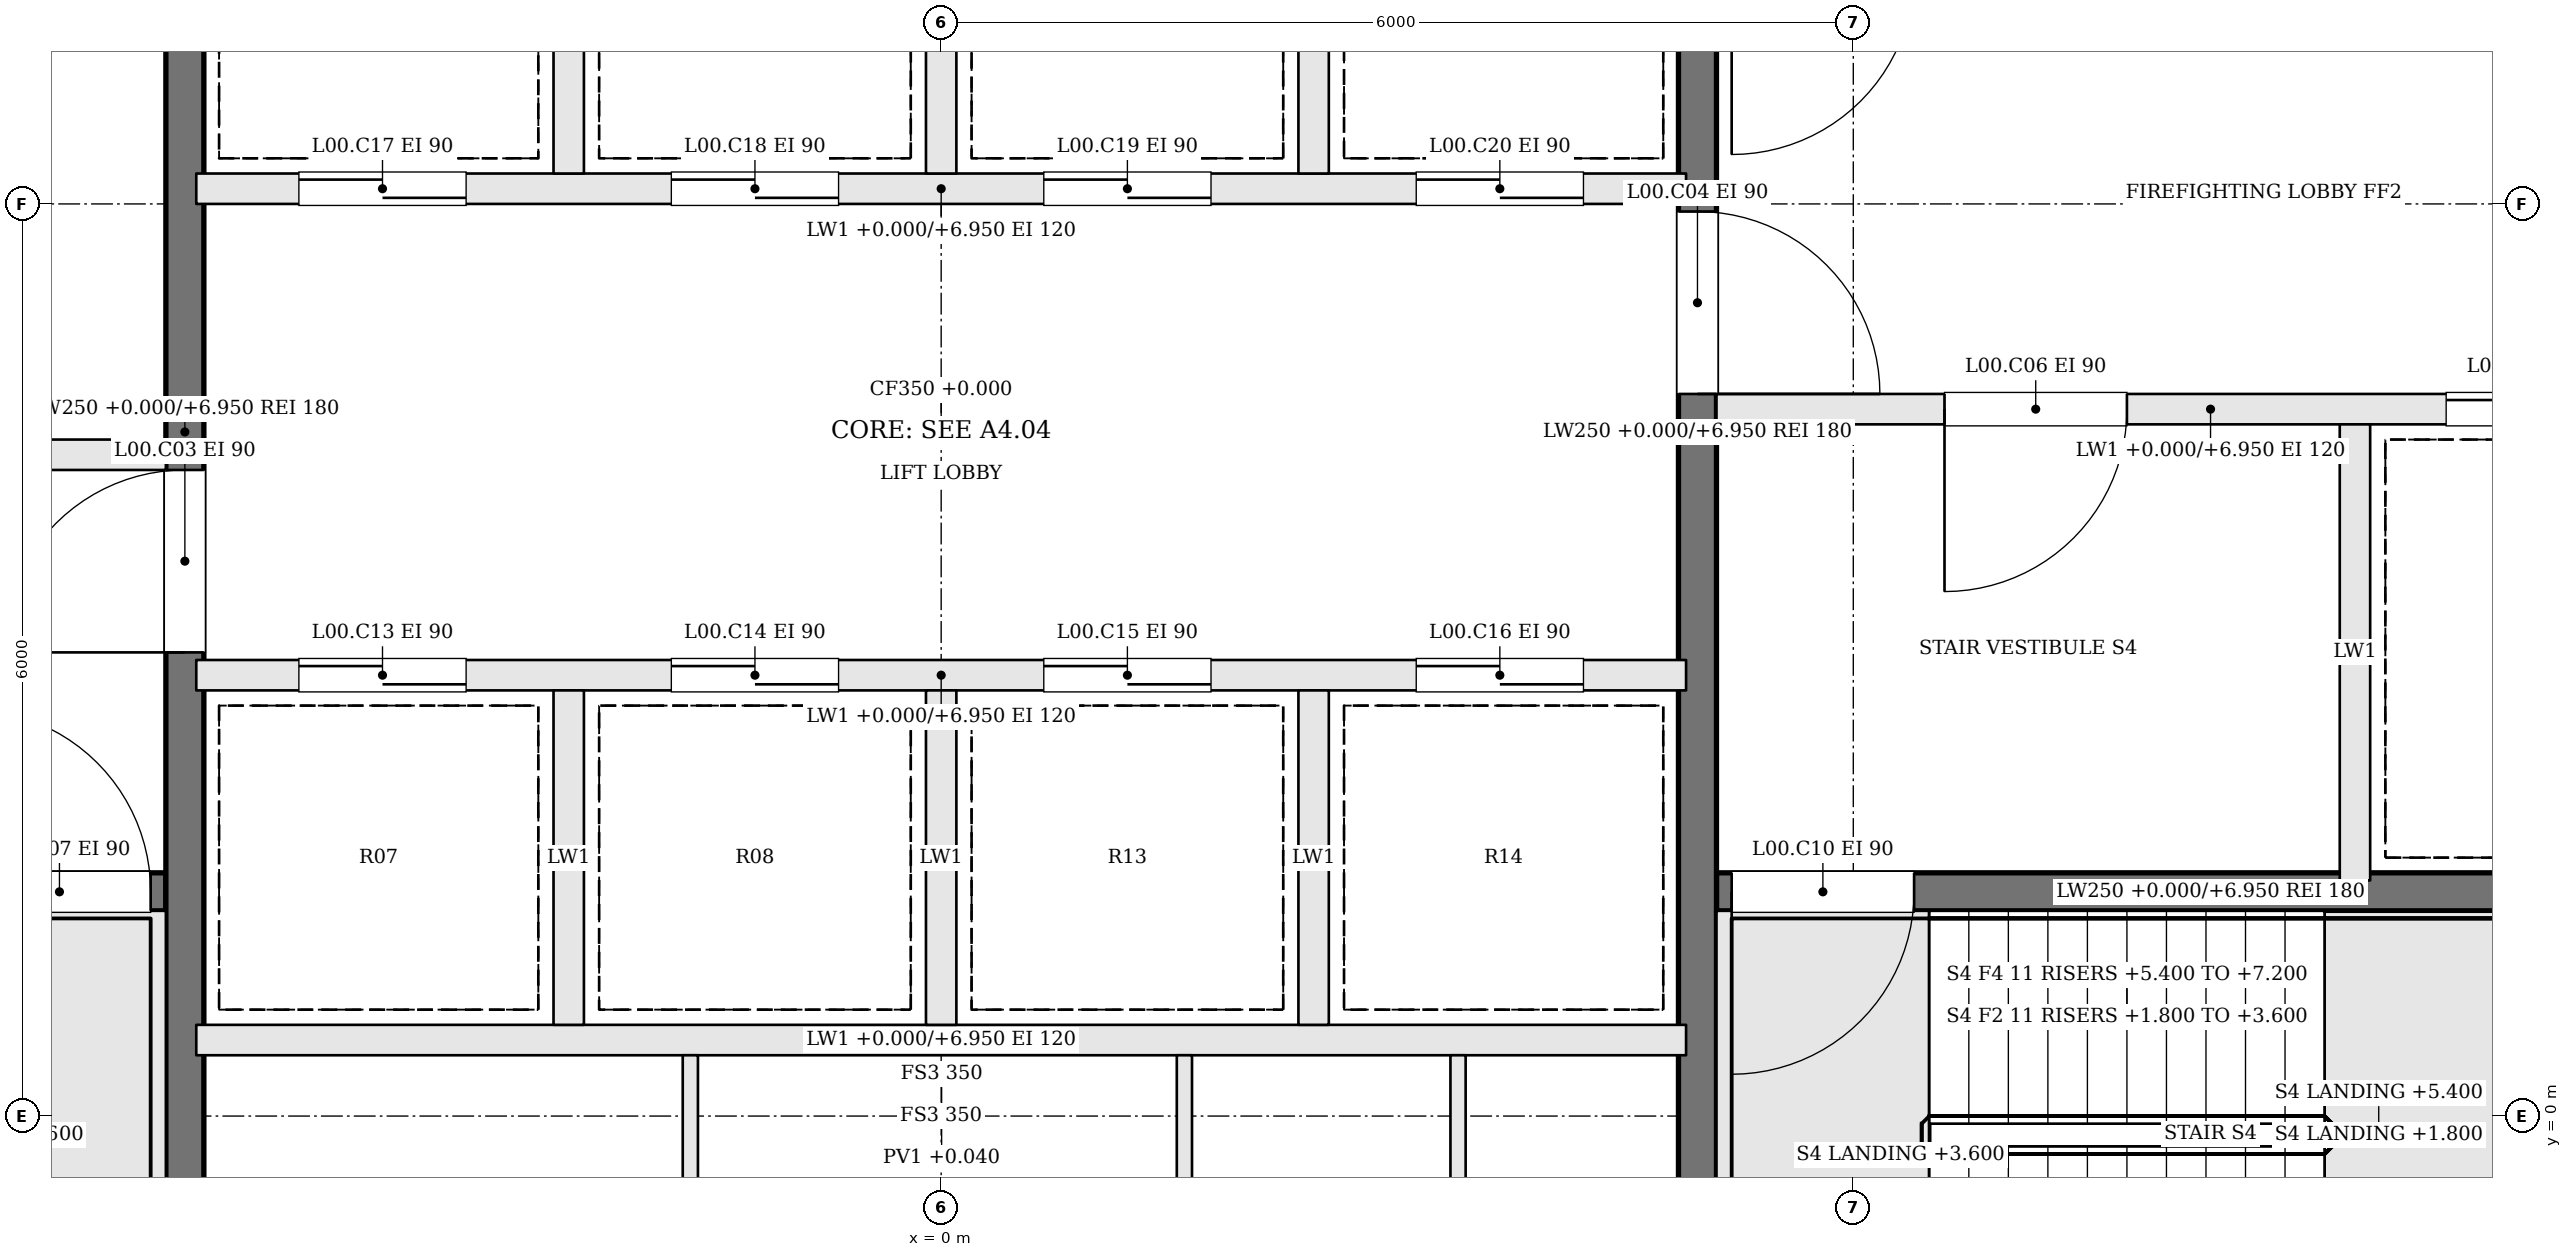
"""IFC4 building model, lengths in metres.
Left out: names, types, materials, properties, quantities, classifications, styles, units other than length and angle.
Written with IfcOpenShell. Run it as: python <this file> out.ifc"""

import sys

from ifc_helpers import new_model, si_unit, direction, frame, frame_2d, origin, place, context, subcontext, project, spatial, rectangle, extrude, element, fill, save


model = new_model("IFC4")
c1 = context("Model", 3, precision=1e-05, world=origin(), true_north=direction((0.0, 1.0)))
c2 = subcontext(c1, "Body", "Model", "MODEL_VIEW")
j1 = project(units=[si_unit("LENGTHUNIT", "METRE"), si_unit("PLANEANGLEUNIT", "RADIAN")], contexts=[c1])
p1 = place(None, origin())
s1 = spatial("IfcSite", under=j1, at=p1, CompositionType="ELEMENT")
p2 = place(p1, origin())
s2 = spatial("IfcBuilding", under=s1, at=p2, CompositionType="ELEMENT")
p3 = place(p2, origin())
s3 = spatial("IfcBuildingStorey", under=s2, at=p3, CompositionType="ELEMENT", Elevation=0.0)
p4 = place(p3, frame((-11.6, 1.475, 0.0), z_axis=(0.0, 0.0, 1.0), x_axis=(1.0, 0.0, 0.0)))
e1 = element("IfcWall", 1, at=p4, inside=s3, PredefinedType="SOLIDWALL", context=c2, shape_type="SweptSolid", body=[
    extrude(rectangle(XDim=6.5, YDim=0.25, at=frame_2d((3.25, 0.0))), origin(), (0.0, 0.0, 1.0), 6.95),
])
p5 = place(p4, frame((5.2, 0.0, 0.0)))
e2 = element("IfcOpeningElement", 2, at=p5, cuts=e1, PredefinedType="OPENING", context=c2, shape_type="SweptSolid", body=[
    extrude(rectangle(XDim=1.2, YDim=2.1, at=frame_2d((0.6, 1.05))), frame((0.0, 0.135, 0.0), z_axis=(0.0, -1.0, 0.0), x_axis=(1.0, 0.0, 0.0)), (0.0, 0.0, 1.0), 0.27),
])
p6 = place(p3, frame((-11.6, 4.35, 0.0), z_axis=(0.0, 0.0, 1.0), x_axis=(1.0, 0.0, 0.0)))
e3 = element("IfcWall", 3, at=p6, inside=s3, PredefinedType="SOLIDWALL", context=c2, shape_type="SweptSolid", body=[
    extrude(rectangle(XDim=6.5, YDim=0.2, at=frame_2d((3.25, 0.0))), origin(), (0.0, 0.0, 1.0), 6.95),
])
p7 = place(p6, frame((3.8, 0.0, 0.0)))
e4 = element("IfcOpeningElement", 4, at=p7, cuts=e3, PredefinedType="OPENING", context=c2, shape_type="SweptSolid", body=[
    extrude(rectangle(XDim=1.2, YDim=2.1, at=frame_2d((0.6, 1.05))), frame((0.0, 0.11, 0.0), z_axis=(0.0, -1.0, 0.0), x_axis=(1.0, 0.0, 0.0)), (0.0, 0.0, 1.0), 0.22),
])
p8 = place(p6, frame((0.5, 0.0, 0.0)))
e5 = element("IfcOpeningElement", 5, at=p8, cuts=e3, PredefinedType="OPENING", context=c2, shape_type="SweptSolid", body=[
    extrude(rectangle(XDim=1.2, YDim=2.1, at=frame_2d((0.6, 1.05))), frame((0.0, 0.11, 0.0), z_axis=(0.0, -1.0, 0.0), x_axis=(1.0, 0.0, 0.0)), (0.0, 0.0, 1.0), 0.22),
])
p9 = place(p3, frame((11.6, 4.65, 0.0), z_axis=(0.0, 0.0, 1.0), x_axis=(-1.0, 0.0, 0.0)))
e6 = element("IfcWall", 6, at=p9, inside=s3, PredefinedType="SOLIDWALL", context=c2, shape_type="SweptSolid", body=[
    extrude(rectangle(XDim=6.5, YDim=0.2, at=frame_2d((3.25, 0.0))), origin(), (0.0, 0.0, 1.0), 6.95),
])
p10 = place(p9, frame((3.8, 0.0, 0.0)))
e7 = element("IfcOpeningElement", 7, at=p10, cuts=e6, PredefinedType="OPENING", context=c2, shape_type="SweptSolid", body=[
    extrude(rectangle(XDim=1.2, YDim=2.1, at=frame_2d((0.6, 1.05))), frame((0.0, 0.11, 0.0), z_axis=(0.0, -1.0, 0.0), x_axis=(1.0, 0.0, 0.0)), (0.0, 0.0, 1.0), 0.22),
])
p11 = place(p9, frame((0.5, 0.0, 0.0)))
e8 = element("IfcOpeningElement", 8, at=p11, cuts=e6, PredefinedType="OPENING", context=c2, shape_type="SweptSolid", body=[
    extrude(rectangle(XDim=1.2, YDim=2.1, at=frame_2d((0.6, 1.05))), frame((0.0, 0.11, 0.0), z_axis=(0.0, -1.0, 0.0), x_axis=(1.0, 0.0, 0.0)), (0.0, 0.0, 1.0), 0.22),
])
p12 = place(p3, frame((11.6, 1.475, 0.0), z_axis=(0.0, 0.0, 1.0), x_axis=(-1.0, 0.0, 0.0)))
e9 = element("IfcWall", 9, at=p12, inside=s3, PredefinedType="SOLIDWALL", context=c2, shape_type="SweptSolid", body=[
    extrude(rectangle(XDim=6.5, YDim=0.25, at=frame_2d((3.25, 0.0))), origin(), (0.0, 0.0, 1.0), 6.95),
])
p13 = place(p12, frame((5.2, 0.0, 0.0)))
e10 = element("IfcOpeningElement", 10, at=p13, cuts=e9, PredefinedType="OPENING", context=c2, shape_type="SweptSolid", body=[
    extrude(rectangle(XDim=1.2, YDim=2.1, at=frame_2d((0.6, 1.05))), frame((0.0, 0.135, 0.0), z_axis=(0.0, -1.0, 0.0), x_axis=(1.0, 0.0, 0.0)), (0.0, 0.0, 1.0), 0.27),
])
p14 = place(p3, frame((9.3, 4.55, 0.0), z_axis=(0.0, 0.0, 1.0), x_axis=(0.0, -1.0, 0.0)))
e11 = element("IfcWall", 11, at=p14, inside=s3, PredefinedType="SOLIDWALL", context=c2, shape_type="SweptSolid", body=[
    extrude(rectangle(XDim=3.0, YDim=0.2, at=frame_2d((1.5, 0.0))), origin(), (0.0, 0.0, 1.0), 6.95),
])
p15 = place(p3, frame((-4.975, -1.6, 0.0), z_axis=(0.0, 0.0, 1.0), x_axis=(0.0, 1.0, 0.0)))
e12 = element("IfcWall", 12, at=p15, inside=s3, PredefinedType="SOLIDWALL", context=c2, shape_type="SweptSolid", body=[
    extrude(rectangle(XDim=12.2, YDim=0.25, at=frame_2d((6.1, 0.0))), origin(), (0.0, 0.0, 1.0), 6.95),
])
p16 = place(p15, frame((4.65, 0.0, 0.0)))
e13 = element("IfcOpeningElement", 13, at=p16, cuts=e12, PredefinedType="OPENING", context=c2, shape_type="SweptSolid", body=[
    extrude(rectangle(XDim=1.2, YDim=2.1, at=frame_2d((0.6, 1.05))), frame((0.0, 0.135, 0.0), z_axis=(0.0, -1.0, 0.0), x_axis=(1.0, 0.0, 0.0)), (0.0, 0.0, 1.0), 0.27),
])
p17 = place(p3, frame((4.975, 10.6, 0.0), z_axis=(0.0, 0.0, 1.0), x_axis=(0.0, -1.0, 0.0)))
e14 = element("IfcWall", 14, at=p17, inside=s3, PredefinedType="SOLIDWALL", context=c2, shape_type="SweptSolid", body=[
    extrude(rectangle(XDim=12.2, YDim=0.25, at=frame_2d((6.1, 0.0))), origin(), (0.0, 0.0, 1.0), 6.95),
])
p18 = place(p17, frame((4.65, 0.0, 0.0)))
e15 = element("IfcOpeningElement", 15, at=p18, cuts=e14, PredefinedType="OPENING", context=c2, shape_type="SweptSolid", body=[
    extrude(rectangle(XDim=1.2, YDim=2.1, at=frame_2d((0.6, 1.05))), frame((0.0, 0.135, 0.0), z_axis=(0.0, -1.0, 0.0), x_axis=(1.0, 0.0, 0.0)), (0.0, 0.0, 1.0), 0.27),
])
p19 = place(p3, frame((-4.9, 0.5, 0.0), z_axis=(0.0, 0.0, 1.0), x_axis=(1.0, 0.0, 0.0)))
e16 = element("IfcWall", 16, at=p19, inside=s3, PredefinedType="SOLIDWALL", context=c2, shape_type="SweptSolid", body=[
    extrude(rectangle(XDim=9.8, YDim=0.2, at=frame_2d((4.9, 0.0))), origin(), (0.0, 0.0, 1.0), 6.95),
])
p20 = place(p3, frame((-4.9, 2.9, 0.0), z_axis=(0.0, 0.0, 1.0), x_axis=(1.0, 0.0, 0.0)))
e17 = element("IfcWall", 17, at=p20, inside=s3, PredefinedType="SOLIDWALL", context=c2, shape_type="SweptSolid", body=[
    extrude(rectangle(XDim=9.8, YDim=0.2, at=frame_2d((4.9, 0.0))), origin(), (0.0, 0.0, 1.0), 6.95),
])
p21 = place(p20, frame((0.675, 0.0, 0.0)))
e18 = element("IfcOpeningElement", 18, at=p21, cuts=e17, PredefinedType="OPENING", context=c2, shape_type="SweptSolid", body=[
    extrude(rectangle(XDim=1.1, YDim=2.1, at=frame_2d((0.55, 1.05))), frame((0.0, 0.11, 0.0), z_axis=(0.0, -1.0, 0.0), x_axis=(1.0, 0.0, 0.0)), (0.0, 0.0, 1.0), 0.22),
])
p22 = place(p20, frame((3.125, 0.0, 0.0)))
e19 = element("IfcOpeningElement", 19, at=p22, cuts=e17, PredefinedType="OPENING", context=c2, shape_type="SweptSolid", body=[
    extrude(rectangle(XDim=1.1, YDim=2.1, at=frame_2d((0.55, 1.05))), frame((0.0, 0.11, 0.0), z_axis=(0.0, -1.0, 0.0), x_axis=(1.0, 0.0, 0.0)), (0.0, 0.0, 1.0), 0.22),
])
p23 = place(p20, frame((5.575, 0.0, 0.0)))
e20 = element("IfcOpeningElement", 20, at=p23, cuts=e17, PredefinedType="OPENING", context=c2, shape_type="SweptSolid", body=[
    extrude(rectangle(XDim=1.1, YDim=2.1, at=frame_2d((0.55, 1.05))), frame((0.0, 0.11, 0.0), z_axis=(0.0, -1.0, 0.0), x_axis=(1.0, 0.0, 0.0)), (0.0, 0.0, 1.0), 0.22),
])
p24 = place(p20, frame((8.025, 0.0, 0.0)))
e21 = element("IfcOpeningElement", 21, at=p24, cuts=e17, PredefinedType="OPENING", context=c2, shape_type="SweptSolid", body=[
    extrude(rectangle(XDim=1.1, YDim=2.1, at=frame_2d((0.55, 1.05))), frame((0.0, 0.11, 0.0), z_axis=(0.0, -1.0, 0.0), x_axis=(1.0, 0.0, 0.0)), (0.0, 0.0, 1.0), 0.22),
])
p25 = place(p3, frame((-4.9, 6.1, 0.0), z_axis=(0.0, 0.0, 1.0), x_axis=(1.0, 0.0, 0.0)))
e22 = element("IfcWall", 22, at=p25, inside=s3, PredefinedType="SOLIDWALL", context=c2, shape_type="SweptSolid", body=[
    extrude(rectangle(XDim=9.8, YDim=0.2, at=frame_2d((4.9, 0.0))), origin(), (0.0, 0.0, 1.0), 6.95),
])
p26 = place(p25, frame((0.675, 0.0, 0.0)))
e23 = element("IfcOpeningElement", 23, at=p26, cuts=e22, PredefinedType="OPENING", context=c2, shape_type="SweptSolid", body=[
    extrude(rectangle(XDim=1.1, YDim=2.1, at=frame_2d((0.55, 1.05))), frame((0.0, 0.11, 0.0), z_axis=(0.0, -1.0, 0.0), x_axis=(1.0, 0.0, 0.0)), (0.0, 0.0, 1.0), 0.22),
])
p27 = place(p25, frame((3.125, 0.0, 0.0)))
e24 = element("IfcOpeningElement", 24, at=p27, cuts=e22, PredefinedType="OPENING", context=c2, shape_type="SweptSolid", body=[
    extrude(rectangle(XDim=1.1, YDim=2.1, at=frame_2d((0.55, 1.05))), frame((0.0, 0.11, 0.0), z_axis=(0.0, -1.0, 0.0), x_axis=(1.0, 0.0, 0.0)), (0.0, 0.0, 1.0), 0.22),
])
p28 = place(p25, frame((5.575, 0.0, 0.0)))
e25 = element("IfcOpeningElement", 25, at=p28, cuts=e22, PredefinedType="OPENING", context=c2, shape_type="SweptSolid", body=[
    extrude(rectangle(XDim=1.1, YDim=2.1, at=frame_2d((0.55, 1.05))), frame((0.0, 0.11, 0.0), z_axis=(0.0, -1.0, 0.0), x_axis=(1.0, 0.0, 0.0)), (0.0, 0.0, 1.0), 0.22),
])
p29 = place(p25, frame((8.025, 0.0, 0.0)))
e26 = element("IfcOpeningElement", 26, at=p29, cuts=e22, PredefinedType="OPENING", context=c2, shape_type="SweptSolid", body=[
    extrude(rectangle(XDim=1.1, YDim=2.1, at=frame_2d((0.55, 1.05))), frame((0.0, 0.11, 0.0), z_axis=(0.0, -1.0, 0.0), x_axis=(1.0, 0.0, 0.0)), (0.0, 0.0, 1.0), 0.22),
])
for number, where, z_axis, x_axis in (
    (27, (-2.45, 0.6, 0.0), (0.0, 0.0, 1.0), (0.0, 1.0, 0.0)),
    (28, (0.0, 0.6, 0.0), (0.0, 0.0, 1.0), (0.0, 1.0, 0.0)),
    (29, (2.45, 0.6, 0.0), (0.0, 0.0, 1.0), (0.0, 1.0, 0.0)),
    (30, (-2.45, 6.2, 0.0), (0.0, 0.0, 1.0), (0.0, 1.0, 0.0)),
    (31, (0.0, 6.2, 0.0), (0.0, 0.0, 1.0), (0.0, 1.0, 0.0)),
    (32, (2.45, 6.2, 0.0), (0.0, 0.0, 1.0), (0.0, 1.0, 0.0)),
):
    element("IfcWall", number, at=place(p3, frame(where, z_axis=z_axis, x_axis=x_axis)), inside=s3, PredefinedType="SOLIDWALL", context=c2, shape_type="SweptSolid", body=[
        extrude(rectangle(XDim=2.2, YDim=0.2, at=frame_2d((1.1, 0.0))), origin(), (0.0, 0.0, 1.0), 6.95),
    ])
for number, where, z_axis, x_axis in (
    (33, (-1.65, -1.6, 0.0), (0.0, 0.0, 1.0), (0.0, 1.0, 0.0)),
    (34, (1.6, -1.6, 0.0), (0.0, 0.0, 1.0), (0.0, 1.0, 0.0)),
    (35, (3.4, -1.6, 0.0), (0.0, 0.0, 1.0), (0.0, 1.0, 0.0)),
):
    element("IfcWall", number, at=place(p3, frame(where, z_axis=z_axis, x_axis=x_axis)), inside=s3, PredefinedType="PARTITIONING", context=c2, shape_type="SweptSolid", body=[
        extrude(rectangle(XDim=2.0, YDim=0.1, at=frame_2d((1.0, 0.0))), origin(), (0.0, 0.0, 1.0), 6.95),
    ])
p30 = place(p16, origin())
e36 = element("IfcDoor", 36, at=p30, inside=s3, OperationType="SINGLE_SWING_LEFT", PredefinedType="DOOR", context=c2, shape_type="SweptSolid", body=[
    extrude(rectangle(XDim=1.2, YDim=2.1, at=frame_2d((0.6, 1.05))), frame((0.0, 0.025, 0.0), z_axis=(0.0, -1.0, 0.0), x_axis=(1.0, 0.0, 0.0)), (0.0, 0.0, 1.0), 0.05),
])
fill(e13, e36)
p31 = place(p18, origin())
e37 = element("IfcDoor", 37, at=p31, inside=s3, OperationType="SINGLE_SWING_RIGHT", PredefinedType="DOOR", context=c2, shape_type="SweptSolid", body=[
    extrude(rectangle(XDim=1.2, YDim=2.1, at=frame_2d((0.6, 1.05))), frame((0.0, 0.025, 0.0), z_axis=(0.0, -1.0, 0.0), x_axis=(1.0, 0.0, 0.0)), (0.0, 0.0, 1.0), 0.05),
])
fill(e15, e37)
p32 = place(p10, origin())
e38 = element("IfcDoor", 38, at=p32, inside=s3, OperationType="SINGLE_SWING_RIGHT", PredefinedType="DOOR", context=c2, shape_type="SweptSolid", body=[
    extrude(rectangle(XDim=1.2, YDim=2.1, at=frame_2d((0.6, 1.05))), frame((0.0, 0.025, 0.0), z_axis=(0.0, -1.0, 0.0), x_axis=(1.0, 0.0, 0.0)), (0.0, 0.0, 1.0), 0.05),
])
fill(e7, e38)
p33 = place(p5, origin())
e39 = element("IfcDoor", 39, at=p33, inside=s3, OperationType="SINGLE_SWING_LEFT", PredefinedType="DOOR", context=c2, shape_type="SweptSolid", body=[
    extrude(rectangle(XDim=1.2, YDim=2.1, at=frame_2d((0.6, 1.05))), frame((0.0, 0.025, 0.0), z_axis=(0.0, -1.0, 0.0), x_axis=(1.0, 0.0, 0.0)), (0.0, 0.0, 1.0), 0.05),
])
fill(e2, e39)
p34 = place(p13, origin())
e40 = element("IfcDoor", 40, at=p34, inside=s3, OperationType="SINGLE_SWING_RIGHT", PredefinedType="DOOR", context=c2, shape_type="SweptSolid", body=[
    extrude(rectangle(XDim=1.2, YDim=2.1, at=frame_2d((0.6, 1.05))), frame((0.0, 0.025, 0.0), z_axis=(0.0, -1.0, 0.0), x_axis=(1.0, 0.0, 0.0)), (0.0, 0.0, 1.0), 0.05),
])
fill(e10, e40)
p35 = place(p11, origin())
e41 = element("IfcDoor", 41, at=p35, inside=s3, OperationType="SLIDING_TO_RIGHT", PredefinedType="DOOR", context=c2, shape_type="SweptSolid", body=[
    extrude(rectangle(XDim=1.2, YDim=2.1, at=frame_2d((0.6, 1.05))), frame((0.0, 0.025, 0.0), z_axis=(0.0, -1.0, 0.0), x_axis=(1.0, 0.0, 0.0)), (0.0, 0.0, 1.0), 0.05),
])
fill(e8, e41)
p36 = place(p21, origin())
e42 = element("IfcDoor", 42, at=p36, inside=s3, OperationType="SLIDING_TO_RIGHT", PredefinedType="DOOR", context=c2, shape_type="SweptSolid", body=[
    extrude(rectangle(XDim=1.1, YDim=2.1, at=frame_2d((0.55, 1.05))), frame((0.0, 0.025, 0.0), z_axis=(0.0, -1.0, 0.0), x_axis=(1.0, 0.0, 0.0)), (0.0, 0.0, 1.0), 0.05),
])
fill(e18, e42)
p37 = place(p22, origin())
e43 = element("IfcDoor", 43, at=p37, inside=s3, OperationType="SLIDING_TO_LEFT", PredefinedType="DOOR", context=c2, shape_type="SweptSolid", body=[
    extrude(rectangle(XDim=1.1, YDim=2.1, at=frame_2d((0.55, 1.05))), frame((0.0, 0.025, 0.0), z_axis=(0.0, -1.0, 0.0), x_axis=(1.0, 0.0, 0.0)), (0.0, 0.0, 1.0), 0.05),
])
fill(e19, e43)
p38 = place(p23, origin())
e44 = element("IfcDoor", 44, at=p38, inside=s3, OperationType="SLIDING_TO_LEFT", PredefinedType="DOOR", context=c2, shape_type="SweptSolid", body=[
    extrude(rectangle(XDim=1.1, YDim=2.1, at=frame_2d((0.55, 1.05))), frame((0.0, 0.025, 0.0), z_axis=(0.0, -1.0, 0.0), x_axis=(1.0, 0.0, 0.0)), (0.0, 0.0, 1.0), 0.05),
])
fill(e20, e44)
p39 = place(p24, origin())
e45 = element("IfcDoor", 45, at=p39, inside=s3, OperationType="SLIDING_TO_RIGHT", PredefinedType="DOOR", context=c2, shape_type="SweptSolid", body=[
    extrude(rectangle(XDim=1.1, YDim=2.1, at=frame_2d((0.55, 1.05))), frame((0.0, 0.025, 0.0), z_axis=(0.0, -1.0, 0.0), x_axis=(1.0, 0.0, 0.0)), (0.0, 0.0, 1.0), 0.05),
])
fill(e21, e45)
p40 = place(p26, origin())
e46 = element("IfcDoor", 46, at=p40, inside=s3, OperationType="SLIDING_TO_RIGHT", PredefinedType="DOOR", context=c2, shape_type="SweptSolid", body=[
    extrude(rectangle(XDim=1.1, YDim=2.1, at=frame_2d((0.55, 1.05))), frame((0.0, 0.025, 0.0), z_axis=(0.0, -1.0, 0.0), x_axis=(1.0, 0.0, 0.0)), (0.0, 0.0, 1.0), 0.05),
])
fill(e23, e46)
p41 = place(p27, origin())
e47 = element("IfcDoor", 47, at=p41, inside=s3, OperationType="SLIDING_TO_LEFT", PredefinedType="DOOR", context=c2, shape_type="SweptSolid", body=[
    extrude(rectangle(XDim=1.1, YDim=2.1, at=frame_2d((0.55, 1.05))), frame((0.0, 0.025, 0.0), z_axis=(0.0, -1.0, 0.0), x_axis=(1.0, 0.0, 0.0)), (0.0, 0.0, 1.0), 0.05),
])
fill(e24, e47)
p42 = place(p28, origin())
e48 = element("IfcDoor", 48, at=p42, inside=s3, OperationType="SLIDING_TO_RIGHT", PredefinedType="DOOR", context=c2, shape_type="SweptSolid", body=[
    extrude(rectangle(XDim=1.1, YDim=2.1, at=frame_2d((0.55, 1.05))), frame((0.0, 0.025, 0.0), z_axis=(0.0, -1.0, 0.0), x_axis=(1.0, 0.0, 0.0)), (0.0, 0.0, 1.0), 0.05),
])
fill(e25, e48)
p43 = place(p29, origin())
e49 = element("IfcDoor", 49, at=p43, inside=s3, OperationType="SLIDING_TO_LEFT", PredefinedType="DOOR", context=c2, shape_type="SweptSolid", body=[
    extrude(rectangle(XDim=1.1, YDim=2.1, at=frame_2d((0.55, 1.05))), frame((0.0, 0.025, 0.0), z_axis=(0.0, -1.0, 0.0), x_axis=(1.0, 0.0, 0.0)), (0.0, 0.0, 1.0), 0.05),
])
fill(e26, e49)
save(model, sys.argv[1])
